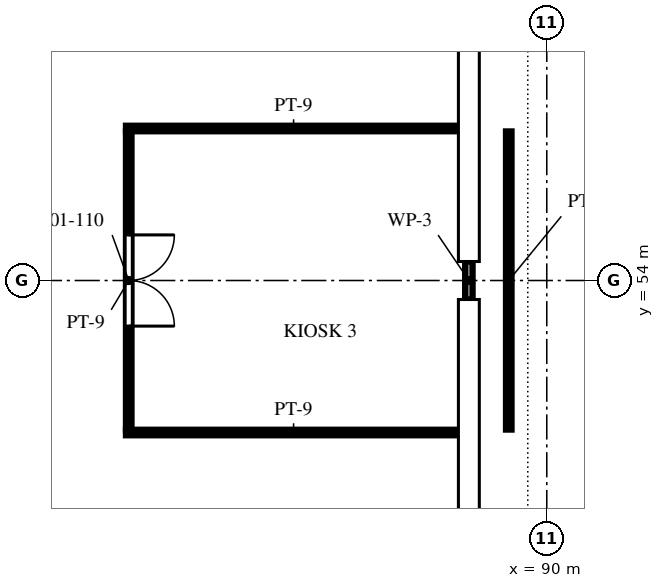
"""IFC4 building model, lengths in metres.
Left out: names, types, materials, properties, quantities, classifications, styles, units other than length and angle.
Written with IfcOpenShell. Run it as: python <this file> out.ifc"""

import sys

from ifc_helpers import new_model, si_unit, direction, frame, frame_2d, origin, place, context, subcontext, project, spatial, polyline, rectangle, outline, extrude, element, fill, save


model = new_model("IFC4")
c1 = context("Model", 3, precision=1e-05, world=origin(), true_north=direction((0.0, 1.0)))
c2 = subcontext(c1, "Body", "Model", "MODEL_VIEW")
j1 = project(units=[si_unit("LENGTHUNIT", "METRE"), si_unit("PLANEANGLEUNIT", "RADIAN")], contexts=[c1])
p1 = place(None, origin())
s1 = spatial("IfcSite", under=j1, at=p1, CompositionType="ELEMENT")
p2 = place(p1, origin())
s2 = spatial("IfcBuilding", under=s1, at=p2, CompositionType="ELEMENT")
p3 = place(p2, frame((0.0, 0.0, 7.5)))
s3 = spatial("IfcBuildingStorey", under=s2, at=p3, CompositionType="ELEMENT", Elevation=7.5)
p4 = place(p3, frame((88.975, 53.75, 0.0), z_axis=(0.0, 0.0, 1.0), x_axis=(0.0, 1.0, 0.0)))
e1 = element("IfcWall", 1, at=p4, inside=s3, PredefinedType="SOLIDWALL", context=c2, shape_type="SweptSolid", body=[
    extrude(rectangle(XDim=0.5, YDim=0.1, at=frame_2d((0.25, 0.0))), origin(), (0.0, 0.0, 1.0), 3.288),
])
p5 = place(p3, frame((84.5, 55.962, 0.0), z_axis=(0.0, 0.0, 1.0), x_axis=(0.0, -1.0, 0.0)))
e2 = element("IfcWall", 2, at=p5, inside=s3, PredefinedType="PARTITIONING", context=c2, shape_type="SweptSolid", body=[
    extrude(rectangle(XDim=3.925, YDim=0.075, at=frame_2d((1.962, 0.0))), origin(), (0.0, 0.0, 1.0), 3.287),
])
p6 = place(p5, frame((1.363, 0.0, 0.0)))
e3 = element("IfcOpeningElement", 3, at=p6, cuts=e2, PredefinedType="OPENING", context=c2, shape_type="SweptSolid", body=[
    extrude(rectangle(XDim=1.2, YDim=2.1, at=frame_2d((0.6, 1.05))), frame((0.0, 0.047, 0.0), z_axis=(0.0, -1.0, 0.0), x_axis=(1.0, 0.0, 0.0)), (0.0, 0.0, 1.0), 0.095),
])
p7 = place(p3, frame((84.462, 52.0, 0.0), z_axis=(0.0, 0.0, 1.0), x_axis=(1.0, 0.0, 0.0)))
e4 = element("IfcWall", 4, at=p7, inside=s3, PredefinedType="PARTITIONING", context=c2, shape_type="SweptSolid", body=[
    extrude(rectangle(XDim=4.413, YDim=0.075, at=frame_2d((2.206, 0.0))), origin(), (0.0, 0.0, 1.0), 3.287),
])
p8 = place(p3, frame((89.5, 52.038, 0.0), z_axis=(0.0, 0.0, 1.0), x_axis=(0.0, 1.0, 0.0)))
e5 = element("IfcWall", 5, at=p8, inside=s3, PredefinedType="PARTITIONING", context=c2, shape_type="SweptSolid", body=[
    extrude(rectangle(XDim=3.925, YDim=0.075, at=frame_2d((1.962, 0.0))), origin(), (0.0, 0.0, 1.0), 3.287),
])
p9 = place(p3, frame((88.875, 56.0, 0.0), z_axis=(0.0, 0.0, 1.0), x_axis=(-1.0, 0.0, 0.0)))
e6 = element("IfcWall", 6, at=p9, inside=s3, PredefinedType="PARTITIONING", context=c2, shape_type="SweptSolid", body=[
    extrude(rectangle(XDim=4.413, YDim=0.075, at=frame_2d((2.206, 0.0))), origin(), (0.0, 0.0, 1.0), 3.287),
])
p10 = place(p6, origin())
e7 = element("IfcDoor", 7, at=p10, inside=s3, OperationType="DOUBLE_DOOR_SINGLE_SWING", PredefinedType="DOOR", context=c2, shape_type="SweptSolid", body=[
    extrude(outline(polyline([(0.0, 0.0), (0.07, 0.0), (0.07, 2.03), (1.13, 2.03), (1.13, 0.0), (1.2, 0.0), (1.2, 2.1), (0.0, 2.1), (0.0, 0.0)])), frame((0.0, 0.025, 0.0), z_axis=(0.0, -1.0, 0.0), x_axis=(1.0, 0.0, 0.0)), (0.0, 0.0, 1.0), 0.05),
    extrude(outline(polyline([(0.074, 0.01), (0.597, 0.01), (0.597, 2.026), (0.074, 2.026), (0.074, 0.01)]), holes=[polyline([(0.178, 0.373), (0.492, 0.373), (0.492, 1.784), (0.178, 1.784), (0.178, 0.373)])]), frame((0.0, 0.017, 0.0), z_axis=(0.0, -1.0, 0.0), x_axis=(1.0, 0.0, 0.0)), (0.0, 0.0, 1.0), 0.035),
    extrude(rectangle(XDim=0.314, YDim=1.411, at=frame_2d((0.335, 1.079))), frame((0.0, 0.009, 0.0), z_axis=(0.0, -1.0, 0.0), x_axis=(1.0, 0.0, 0.0)), (0.0, 0.0, 1.0), 0.017),
    extrude(outline(polyline([(0.603, 0.01), (1.126, 0.01), (1.126, 2.026), (0.603, 2.026), (0.603, 0.01)]), holes=[polyline([(0.708, 0.373), (1.021, 0.373), (1.021, 1.784), (0.708, 1.784), (0.708, 0.373)])]), frame((0.0, 0.017, 0.0), z_axis=(0.0, -1.0, 0.0), x_axis=(1.0, 0.0, 0.0)), (0.0, 0.0, 1.0), 0.035),
    extrude(rectangle(XDim=0.314, YDim=1.411, at=frame_2d((0.865, 1.079))), frame((0.0, 0.009, 0.0), z_axis=(0.0, -1.0, 0.0), x_axis=(1.0, 0.0, 0.0)), (0.0, 0.0, 1.0), 0.017),
])
fill(e3, e7)
save(model, sys.argv[1])
